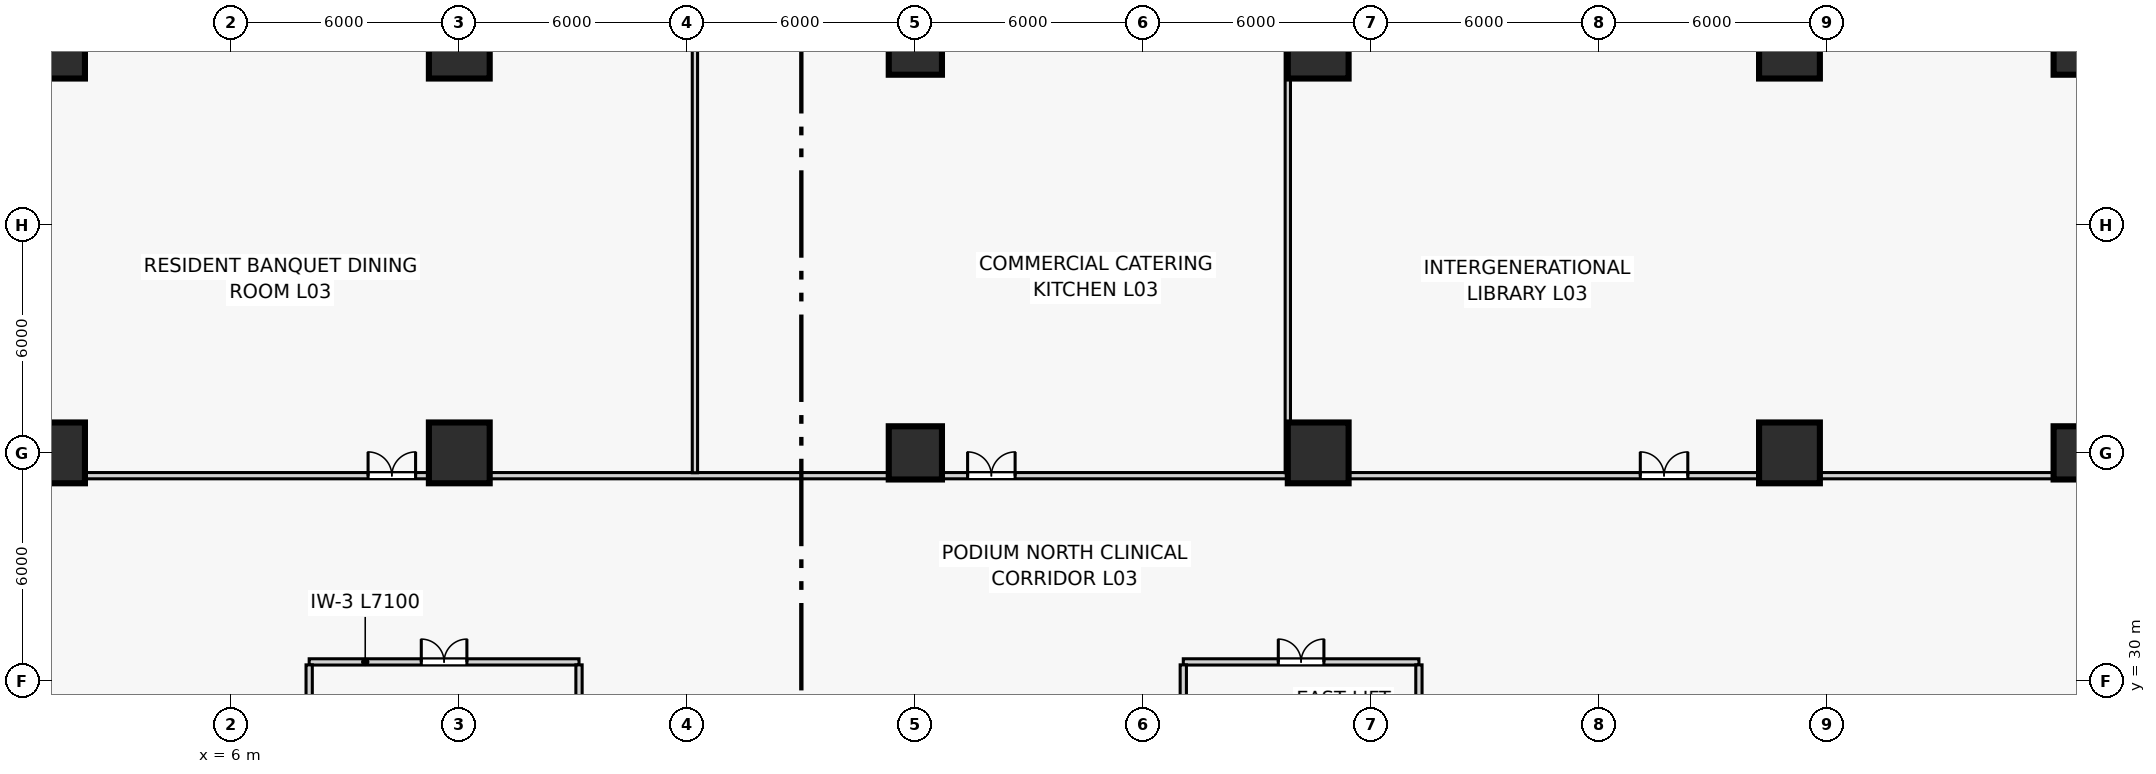
"""IFC4 building model, lengths in metres.
Left out: names, types, materials, properties, quantities, classifications, styles, units other than length and angle.
Written with IfcOpenShell. Run it as: python <this file> out.ifc"""

import sys

from ifc_helpers import new_model, si_unit, direction, frame, frame_2d, origin, origin_2d, place, context, subcontext, project, spatial, rectangle, extrude, source, transform, mapped, element, fill, save


model = new_model("IFC4")
c1 = context("Model", 3, precision=1e-05, world=origin(), true_north=direction((0.0, 1.0)))
c2 = subcontext(c1, "Body", "Model", "MODEL_VIEW")
j1 = project(units=[si_unit("LENGTHUNIT", "METRE"), si_unit("PLANEANGLEUNIT", "RADIAN")], contexts=[c1])
p1 = place(None, origin())
s1 = spatial("IfcSite", under=j1, at=p1, CompositionType="ELEMENT")
p2 = place(p1, origin())
s2 = spatial("IfcBuilding", under=s1, at=p2, CompositionType="ELEMENT")
p3 = place(p2, frame((0.0, 0.0, 13.5)))
s3 = spatial("IfcBuildingStorey", under=s2, at=p3, CompositionType="ELEMENT", Elevation=13.5)
m1 = source(origin(), c2, "Body", "SweptSolid", [
    extrude(rectangle(XDim=1.6, YDim=1.6, at=origin_2d()), origin(), (0.0, 0.0, 1.0), 4.5),
])
for number, where, z_axis, x_axis in (
    (1, (1.35, 36.0, 0.0), (0.0, 0.0, 1.0), (1.0, 0.0, 0.0)),
    (2, (1.35, 46.65, 0.0), (0.0, 0.0, 1.0), (1.0, 0.0, 0.0)),
    (3, (12.0, 36.0, 0.0), (0.0, 0.0, 1.0), (1.0, 0.0, 0.0)),
    (4, (12.0, 46.65, 0.0), (0.0, 0.0, 1.0), (1.0, 0.0, 0.0)),
):
    element("IfcColumn", number, at=place(p3, frame(where, z_axis=z_axis, x_axis=x_axis)), inside=s3, PredefinedType="COLUMN", context=c2, shape_type="MappedRepresentation", body=[
        mapped(m1, transform((0.0, 0.0, 0.0), scale=1.0)),
    ])
m2 = source(origin(), c2, "Body", "SweptSolid", [
    extrude(rectangle(XDim=1.4, YDim=1.4, at=origin_2d()), origin(), (0.0, 0.0, 1.0), 4.5),
])
for number, where, z_axis, x_axis in (
    (5, (24.0, 36.0, 0.0), (0.0, 0.0, 1.0), (1.0, 0.0, 0.0)),
    (6, (24.0, 46.65, 0.0), (0.0, 0.0, 1.0), (1.0, 0.0, 0.0)),
):
    element("IfcColumn", number, at=place(p3, frame(where, z_axis=z_axis, x_axis=x_axis)), inside=s3, PredefinedType="COLUMN", context=c2, shape_type="MappedRepresentation", body=[
        mapped(m2, transform((0.0, 0.0, 0.0), scale=1.0)),
    ])
for number, where, z_axis, x_axis in (
    (7, (34.6, 36.0, 0.0), (0.0, 0.0, 1.0), (1.0, 0.0, 0.0)),
    (8, (34.6, 46.65, 0.0), (0.0, 0.0, 1.0), (1.0, 0.0, 0.0)),
    (9, (47.0, 36.0, 0.0), (0.0, 0.0, 1.0), (1.0, 0.0, 0.0)),
    (10, (47.0, 46.65, 0.0), (0.0, 0.0, 1.0), (1.0, 0.0, 0.0)),
):
    element("IfcColumn", number, at=place(p3, frame(where, z_axis=z_axis, x_axis=x_axis)), inside=s3, PredefinedType="COLUMN", context=c2, shape_type="MappedRepresentation", body=[
        mapped(m1, transform((0.0, 0.0, 0.0), scale=1.0)),
    ])
for number, where, z_axis, x_axis in (
    (11, (54.65, 36.0, 0.0), (0.0, 0.0, 1.0), (1.0, 0.0, 0.0)),
    (12, (54.65, 46.65, 0.0), (0.0, 0.0, 1.0), (1.0, 0.0, 0.0)),
):
    element("IfcColumn", number, at=place(p3, frame(where, z_axis=z_axis, x_axis=x_axis)), inside=s3, PredefinedType="COLUMN", context=c2, shape_type="MappedRepresentation", body=[
        mapped(m2, transform((0.0, 0.0, 0.0), scale=1.0)),
    ])
p4 = place(p3, frame((8.05, 30.5, 0.0), z_axis=(0.0, 0.0, 1.0), x_axis=(1.0, 0.0, 0.0)))
e13 = element("IfcWall", 13, at=p4, inside=s3, PredefinedType="PARTITIONING", context=c2, shape_type="SweptSolid", body=[
    extrude(rectangle(XDim=7.1, YDim=0.165, at=frame_2d((3.55, 0.0))), origin(), (0.0, 0.0, 1.0), 4.16),
])
p5 = place(p4, frame((2.95, 0.0, 0.0)))
e14 = element("IfcOpeningElement", 14, at=p5, cuts=e13, PredefinedType="OPENING", context=c2, shape_type="SweptSolid", body=[
    extrude(rectangle(XDim=1.2, YDim=2.2, at=frame_2d((0.6, 1.1))), frame((0.0, 0.093, 0.0), z_axis=(0.0, -1.0, 0.0), x_axis=(1.0, 0.0, 0.0)), (0.0, 0.0, 1.0), 0.185),
])
for number, where, z_axis, x_axis in (
    (15, (8.05, 27.62, 0.0), (0.0, 0.0, 1.0), (0.0, 1.0, 0.0)),
    (16, (15.15, 27.62, 0.0), (0.0, 0.0, 1.0), (0.0, 1.0, 0.0)),
):
    element("IfcWall", number, at=place(p3, frame(where, z_axis=z_axis, x_axis=x_axis)), inside=s3, PredefinedType="PARTITIONING", context=c2, shape_type="SweptSolid", body=[
        extrude(rectangle(XDim=2.802, YDim=0.165, at=frame_2d((1.401, 0.0))), origin(), (0.0, 0.0, 1.0), 4.16),
    ])
p6 = place(p3, frame((31.05, 30.5, 0.0), z_axis=(0.0, 0.0, 1.0), x_axis=(1.0, 0.0, 0.0)))
e17 = element("IfcWall", 17, at=p6, inside=s3, PredefinedType="PARTITIONING", context=c2, shape_type="SweptSolid", body=[
    extrude(rectangle(XDim=6.2, YDim=0.165, at=frame_2d((3.1, 0.0))), origin(), (0.0, 0.0, 1.0), 4.16),
])
p7 = place(p6, frame((2.5, 0.0, 0.0)))
e18 = element("IfcOpeningElement", 18, at=p7, cuts=e17, PredefinedType="OPENING", context=c2, shape_type="SweptSolid", body=[
    extrude(rectangle(XDim=1.2, YDim=2.2, at=frame_2d((0.6, 1.1))), frame((0.0, 0.093, 0.0), z_axis=(0.0, -1.0, 0.0), x_axis=(1.0, 0.0, 0.0)), (0.0, 0.0, 1.0), 0.185),
])
for number, where, z_axis, x_axis in (
    (19, (31.05, 27.62, 0.0), (0.0, 0.0, 1.0), (0.0, 1.0, 0.0)),
    (20, (37.25, 27.62, 0.0), (0.0, 0.0, 1.0), (0.0, 1.0, 0.0)),
):
    element("IfcWall", number, at=place(p3, frame(where, z_axis=z_axis, x_axis=x_axis)), inside=s3, PredefinedType="PARTITIONING", context=c2, shape_type="SweptSolid", body=[
        extrude(rectangle(XDim=2.802, YDim=0.165, at=frame_2d((1.401, 0.0))), origin(), (0.0, 0.0, 1.0), 4.16),
    ])
p8 = place(p3, frame((0.185, 35.4, 0.0), z_axis=(0.0, 0.0, 1.0), x_axis=(1.0, 0.0, 0.0)))
e21 = element("IfcWall", 21, at=p8, inside=s3, PredefinedType="PARTITIONING", context=c2, shape_type="SweptSolid", body=[
    extrude(rectangle(XDim=55.63, YDim=0.165, at=frame_2d((27.815, 0.0))), origin(), (0.0, 0.0, 1.0), 4.16),
])
p9 = place(p8, frame((9.415, 0.0, 0.0)))
e22 = element("IfcOpeningElement", 22, at=p9, cuts=e21, PredefinedType="OPENING", context=c2, shape_type="SweptSolid", body=[
    extrude(rectangle(XDim=1.25, YDim=2.2, at=frame_2d((0.625, 1.1))), frame((0.0, 0.093, 0.0), z_axis=(0.0, -1.0, 0.0), x_axis=(1.0, 0.0, 0.0)), (0.0, 0.0, 1.0), 0.185),
])
p10 = place(p8, frame((25.19, 0.0, 0.0)))
e23 = element("IfcOpeningElement", 23, at=p10, cuts=e21, PredefinedType="OPENING", context=c2, shape_type="SweptSolid", body=[
    extrude(rectangle(XDim=1.25, YDim=2.2, at=frame_2d((0.625, 1.1))), frame((0.0, 0.093, 0.0), z_axis=(0.0, -1.0, 0.0), x_axis=(1.0, 0.0, 0.0)), (0.0, 0.0, 1.0), 0.185),
])
p11 = place(p8, frame((42.89, 0.0, 0.0)))
e24 = element("IfcOpeningElement", 24, at=p11, cuts=e21, PredefinedType="OPENING", context=c2, shape_type="SweptSolid", body=[
    extrude(rectangle(XDim=1.25, YDim=2.2, at=frame_2d((0.625, 1.1))), frame((0.0, 0.093, 0.0), z_axis=(0.0, -1.0, 0.0), x_axis=(1.0, 0.0, 0.0)), (0.0, 0.0, 1.0), 0.185),
])
for number, where, z_axis, x_axis in (
    (25, (18.2, 35.478, 0.0), (0.0, 0.0, 1.0), (0.0, 1.0, 0.0)),
    (26, (33.8, 35.478, 0.0), (0.0, 0.0, 1.0), (0.0, 1.0, 0.0)),
):
    element("IfcWall", number, at=place(p3, frame(where, z_axis=z_axis, x_axis=x_axis)), inside=s3, PredefinedType="PARTITIONING", context=c2, shape_type="SweptSolid", body=[
        extrude(rectangle(XDim=12.337, YDim=0.14, at=frame_2d((6.169, 0.0))), origin(), (0.0, 0.0, 1.0), 4.16),
    ])
m3 = source(origin(), c2, "Body", "SweptSolid", [
    extrude(rectangle(XDim=1.2, YDim=2.2, at=frame_2d((0.6, 1.1))), frame((0.0, 0.025, 0.0), z_axis=(0.0, -1.0, 0.0), x_axis=(1.0, 0.0, 0.0)), (0.0, 0.0, 1.0), 0.05),
])
p12 = place(p5, origin())
e27 = element("IfcDoor", 27, at=p12, inside=s3, OperationType="DOUBLE_DOOR_SINGLE_SWING", PredefinedType="DOOR", context=c2, shape_type="MappedRepresentation", body=[
    mapped(m3, transform((0.0, 0.0, 0.0), scale=1.0)),
])
fill(e14, e27)
p13 = place(p7, origin())
e28 = element("IfcDoor", 28, at=p13, inside=s3, OperationType="DOUBLE_DOOR_SINGLE_SWING", PredefinedType="DOOR", context=c2, shape_type="MappedRepresentation", body=[
    mapped(m3, transform((0.0, 0.0, 0.0), scale=1.0)),
])
fill(e18, e28)
m4 = source(origin(), c2, "Body", "SweptSolid", [
    extrude(rectangle(XDim=1.25, YDim=2.2, at=frame_2d((0.625, 1.1))), frame((0.0, 0.025, 0.0), z_axis=(0.0, -1.0, 0.0), x_axis=(1.0, 0.0, 0.0)), (0.0, 0.0, 1.0), 0.05),
])
p14 = place(p9, origin())
e29 = element("IfcDoor", 29, at=p14, inside=s3, OperationType="DOUBLE_DOOR_SINGLE_SWING", PredefinedType="DOOR", context=c2, shape_type="MappedRepresentation", body=[
    mapped(m4, transform((0.0, 0.0, 0.0), scale=1.0)),
])
fill(e22, e29)
p15 = place(p10, origin())
e30 = element("IfcDoor", 30, at=p15, inside=s3, OperationType="DOUBLE_DOOR_SINGLE_SWING", PredefinedType="DOOR", context=c2, shape_type="MappedRepresentation", body=[
    mapped(m4, transform((0.0, 0.0, 0.0), scale=1.0)),
])
fill(e23, e30)
p16 = place(p11, origin())
e31 = element("IfcDoor", 31, at=p16, inside=s3, OperationType="DOUBLE_DOOR_SINGLE_SWING", PredefinedType="DOOR", context=c2, shape_type="MappedRepresentation", body=[
    mapped(m4, transform((0.0, 0.0, 0.0), scale=1.0)),
])
fill(e24, e31)
save(model, sys.argv[1])
